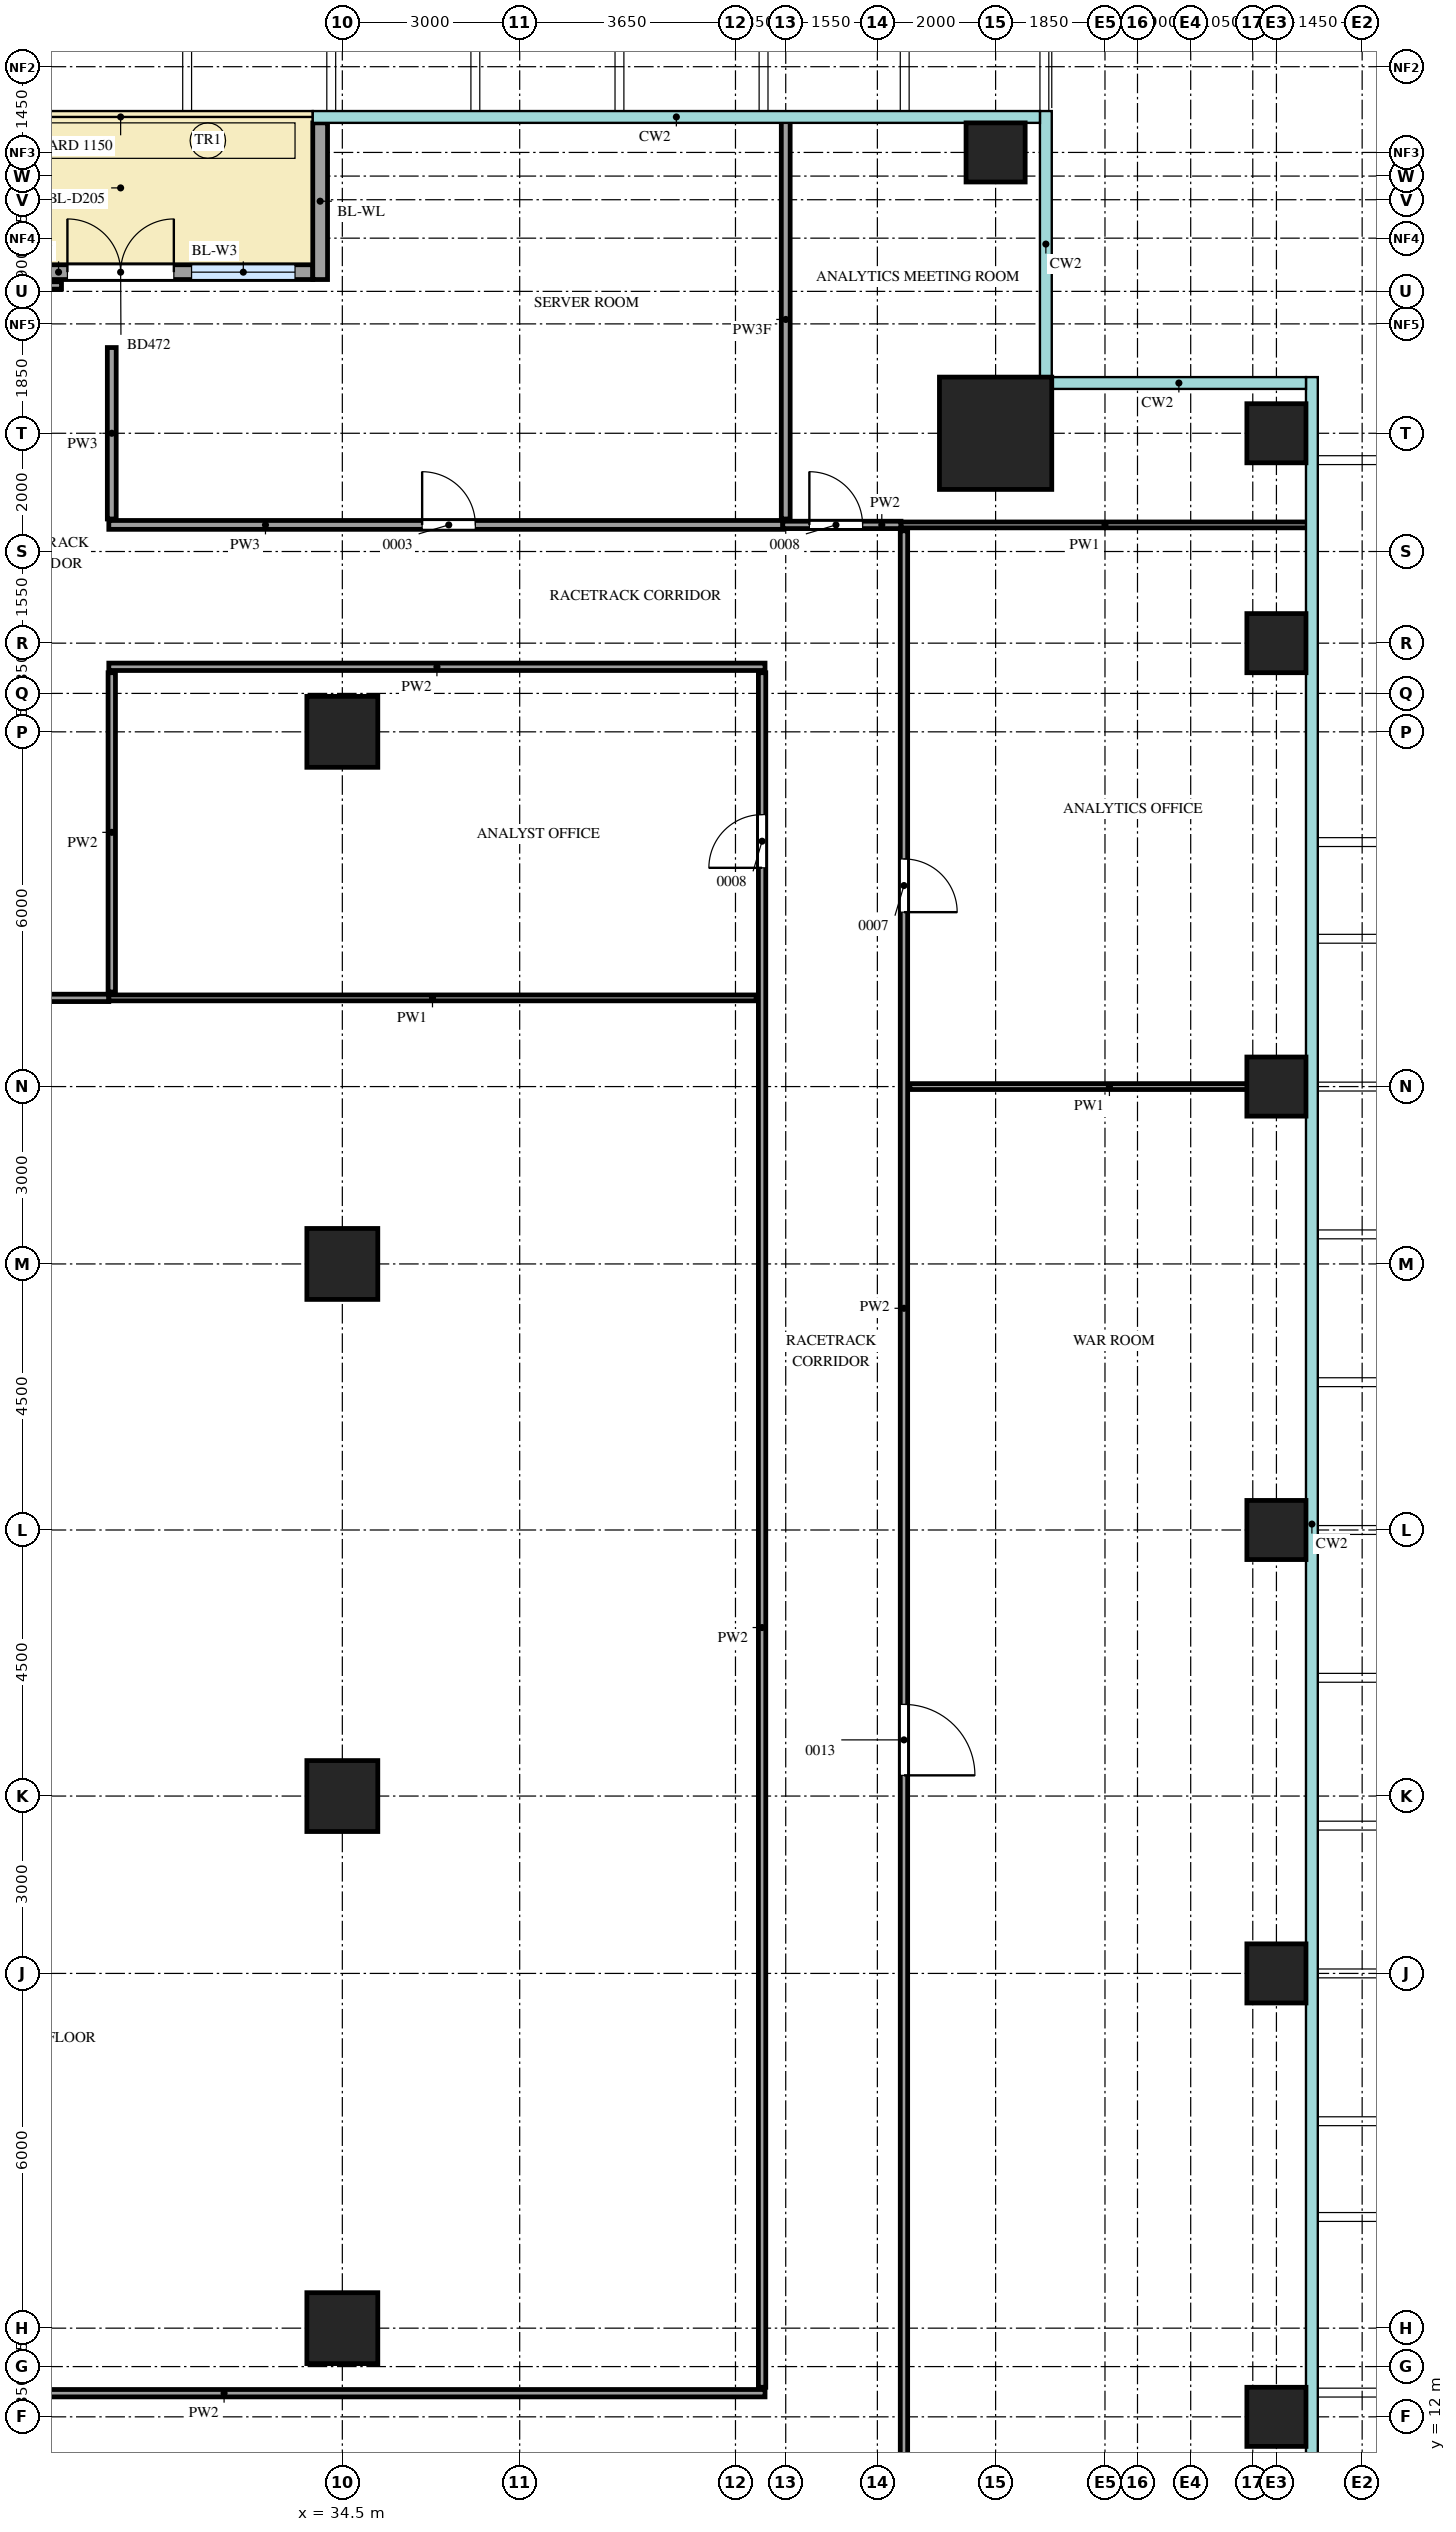
"""IFC4 building model, lengths in metres.
Left out: names, types, materials, properties, quantities, classifications, styles, units other than length and angle.
Written with IfcOpenShell. Run it as: python <this file> out.ifc"""

import sys

from ifc_helpers import new_model, si_unit, direction, frame, frame_2d, origin, origin_2d, place, context, subcontext, project, spatial, rectangle, extrude, source, transform, mapped, element, fill, save


model = new_model("IFC4")
c1 = context("Model", 3, precision=1e-05, world=origin(), true_north=direction((0.0, 1.0)))
c2 = subcontext(c1, "Body", "Model", "MODEL_VIEW")
j1 = project(units=[si_unit("LENGTHUNIT", "METRE"), si_unit("PLANEANGLEUNIT", "RADIAN")], contexts=[c1])
p1 = place(None, origin())
s1 = spatial("IfcSite", under=j1, at=p1, CompositionType="ELEMENT")
p2 = place(p1, origin())
s2 = spatial("IfcBuilding", under=s1, at=p2, CompositionType="ELEMENT")
p3 = place(p2, frame((0.0, 0.0, 212.7)))
s3 = spatial("IfcBuildingStorey", under=s2, at=p3, CompositionType="ELEMENT", Elevation=212.7)
m1 = source(origin(), c2, "Body", "SweptSolid", [
    extrude(rectangle(XDim=1.9, YDim=1.9, at=origin_2d()), origin(), (0.0, 0.0, 1.0), 4.0),
])
p4 = place(p3, frame((45.55, 45.55, 0.0), z_axis=(0.0, 0.0, 1.0), x_axis=(1.0, 0.0, 0.0)))
e1 = element("IfcColumn", 1, at=p4, inside=s3, PredefinedType="COLUMN", context=c2, shape_type="MappedRepresentation", body=[
    mapped(m1, transform((0.0, 0.0, 0.0))),
])
m2 = source(origin(), c2, "Body", "SweptSolid", [
    extrude(rectangle(XDim=1.0, YDim=1.0, at=origin_2d()), origin(), (0.0, 0.0, 1.0), 4.0),
])
for number, where, z_axis, x_axis in (
    (2, (50.3, 12.0, 0.0), (0.0, 0.0, 1.0), (1.0, 0.0, 0.0)),
    (3, (50.3, 19.5, 0.0), (0.0, 0.0, 1.0), (1.0, 0.0, 0.0)),
    (4, (50.3, 27.0, 0.0), (0.0, 0.0, 1.0), (1.0, 0.0, 0.0)),
    (5, (50.3, 34.5, 0.0), (0.0, 0.0, 1.0), (1.0, 0.0, 0.0)),
    (6, (50.3, 42.0, 0.0), (0.0, 0.0, 1.0), (1.0, 0.0, 0.0)),
    (7, (50.3, 45.55, 0.0), (0.0, 0.0, 1.0), (1.0, 0.0, 0.0)),
    (8, (45.55, 50.3, 0.0), (0.0, 0.0, 1.0), (1.0, 0.0, 0.0)),
):
    element("IfcColumn", number, at=place(p3, frame(where, z_axis=z_axis, x_axis=x_axis)), inside=s3, PredefinedType="COLUMN", context=c2, shape_type="MappedRepresentation", body=[
        mapped(m2, transform((0.0, 0.0, 0.0))),
    ])
m3 = source(origin(), c2, "Body", "SweptSolid", [
    extrude(rectangle(XDim=1.2, YDim=1.2, at=origin_2d()), origin(), (0.0, 0.0, 1.0), 4.0),
])
for number, where, z_axis, x_axis in (
    (9, (34.5, 13.5, 0.0), (0.0, 0.0, 1.0), (1.0, 0.0, 0.0)),
    (10, (34.5, 22.5, 0.0), (0.0, 0.0, 1.0), (1.0, 0.0, 0.0)),
    (11, (34.5, 31.5, 0.0), (0.0, 0.0, 1.0), (1.0, 0.0, 0.0)),
    (12, (34.5, 40.5, 0.0), (0.0, 0.0, 1.0), (1.0, 0.0, 0.0)),
):
    element("IfcColumn", number, at=place(p3, frame(where, z_axis=z_axis, x_axis=x_axis)), inside=s3, PredefinedType="COLUMN", context=c2, shape_type="MappedRepresentation", body=[
        mapped(m3, transform((0.0, 0.0, 0.0))),
    ])
m4 = source(origin(), c2, "Body", "SweptSolid", [
    extrude(rectangle(XDim=6.5, YDim=0.25, at=frame_2d((3.25, 0.0))), origin(), (0.0, 0.0, 1.0), 3.75),
])
p5 = place(p3, frame((27.5, 48.275, 0.0), z_axis=(0.0, 0.0, 1.0), x_axis=(1.0, 0.0, 0.0)))
e13 = element("IfcWall", 13, at=p5, inside=s3, PredefinedType="SOLIDWALL", context=c2, shape_type="MappedRepresentation", body=[
    mapped(m4, transform((0.0, 0.0, 0.0))),
])
m5 = source(origin(), c2, "Body", "SweptSolid", [
    extrude(rectangle(XDim=1.75, YDim=2.4, at=frame_2d((0.875, 1.2))), frame((0.0, 0.135, 0.0), z_axis=(0.0, -1.0, 0.0), x_axis=(1.0, 0.0, 0.0)), (0.0, 0.0, 1.0), 0.27),
])
p6 = place(p5, frame((0.3, 0.0, 0.0)))
e14 = element("IfcOpeningElement", 14, at=p6, cuts=e13, PredefinedType="OPENING", context=c2, shape_type="MappedRepresentation", body=[
    mapped(m5, transform((0.0, 0.0, 0.0))),
])
p7 = place(p5, frame((4.45, 0.0, 0.0)))
e15 = element("IfcOpeningElement", 15, at=p7, cuts=e13, PredefinedType="OPENING", context=c2, shape_type="MappedRepresentation", body=[
    mapped(m5, transform((0.0, 0.0, 0.0))),
])
m6 = source(origin(), c2, "Body", "SweptSolid", [
    extrude(rectangle(XDim=1.8, YDim=2.4, at=frame_2d((0.9, 1.2))), frame((0.0, 0.135, 0.0), z_axis=(0.0, -1.0, 0.0), x_axis=(1.0, 0.0, 0.0)), (0.0, 0.0, 1.0), 0.27),
])
p8 = place(p5, frame((2.35, 0.0, 0.0)))
e16 = element("IfcOpeningElement", 16, at=p8, cuts=e13, PredefinedType="OPENING", context=c2, shape_type="MappedRepresentation", body=[
    mapped(m6, transform((0.0, 0.0, 0.0))),
])
m7 = source(origin(), c2, "Body", "SweptSolid", [
    extrude(rectangle(XDim=2.65, YDim=0.25, at=frame_2d((1.325, 0.0))), origin(), (0.0, 0.0, 1.0), 3.1),
])
p9 = place(p3, frame((34.125, 50.8, 0.0), z_axis=(0.0, 0.0, 1.0), x_axis=(0.0, -1.0, 0.0)))
e17 = element("IfcWall", 17, at=p9, inside=s3, PredefinedType="SOLIDWALL", context=c2, shape_type="MappedRepresentation", body=[
    mapped(m7, transform((0.0, 0.0, 0.0))),
])
m8 = source(origin(), c2, "Body", "SweptSolid", [
    extrude(rectangle(XDim=33.8, YDim=0.125, at=frame_2d((16.9, 0.0))), origin(), (0.0, 0.0, 1.0), 3.8),
])
p10 = place(p3, frame((44.0, 10.1, 0.0), z_axis=(0.0, 0.0, 1.0), x_axis=(0.0, 1.0, 0.0)))
e18 = element("IfcWall", 18, at=p10, inside=s3, PredefinedType="PARTITIONING", context=c2, shape_type="MappedRepresentation", body=[
    mapped(m8, transform((0.0, 0.0, 0.0))),
])
m9 = source(origin(), c2, "Body", "SweptSolid", [
    extrude(rectangle(XDim=1.2, YDim=2.1, at=frame_2d((0.6, 1.05))), frame((0.0, 0.073, 0.0), z_axis=(0.0, -1.0, 0.0), x_axis=(1.0, 0.0, 0.0)), (0.0, 0.0, 1.0), 0.145),
])
p11 = place(p10, frame((12.75, 0.0, 0.0)))
e19 = element("IfcOpeningElement", 19, at=p11, cuts=e18, PredefinedType="OPENING", context=c2, shape_type="MappedRepresentation", body=[
    mapped(m9, transform((0.0, 0.0, 0.0))),
])
m10 = source(origin(), c2, "Body", "SweptSolid", [
    extrude(rectangle(XDim=0.9, YDim=2.1, at=frame_2d((0.45, 1.05))), frame((0.0, 0.073, 0.0), z_axis=(0.0, -1.0, 0.0), x_axis=(1.0, 0.0, 0.0)), (0.0, 0.0, 1.0), 0.145),
])
p12 = place(p10, frame((27.35, 0.0, 0.0)))
e20 = element("IfcOpeningElement", 20, at=p12, cuts=e18, PredefinedType="OPENING", context=c2, shape_type="MappedRepresentation", body=[
    mapped(m10, transform((0.0, 0.0, 0.0))),
])
m11 = source(origin(), c2, "Body", "SweptSolid", [
    extrude(rectangle(XDim=18.3, YDim=0.125, at=frame_2d((9.15, 0.0))), origin(), (0.0, 0.0, 1.0), 3.8),
])
p13 = place(p3, frame((23.35, 12.4, 0.0), z_axis=(0.0, 0.0, 1.0), x_axis=(1.0, 0.0, 0.0)))
e21 = element("IfcWall", 21, at=p13, inside=s3, PredefinedType="PARTITIONING", context=c2, shape_type="MappedRepresentation", body=[
    mapped(m11, transform((0.0, 0.0, 0.0))),
])
m12 = source(origin(), c2, "Body", "SweptSolid", [
    extrude(rectangle(XDim=29.0, YDim=0.125, at=frame_2d((14.5, 0.0))), origin(), (0.0, 0.0, 1.0), 3.8),
])
p14 = place(p3, frame((41.6, 12.5, 0.0), z_axis=(0.0, 0.0, 1.0), x_axis=(0.0, 1.0, 0.0)))
e22 = element("IfcWall", 22, at=p14, inside=s3, PredefinedType="PARTITIONING", context=c2, shape_type="MappedRepresentation", body=[
    mapped(m12, transform((0.0, 0.0, 0.0))),
])
p15 = place(p14, frame((25.7, 0.0, 0.0)))
e23 = element("IfcOpeningElement", 23, at=p15, cuts=e22, PredefinedType="OPENING", context=c2, shape_type="MappedRepresentation", body=[
    mapped(m10, transform((0.0, 0.0, 0.0))),
])
m13 = source(origin(), c2, "Body", "SweptSolid", [
    extrude(rectangle(XDim=6.75, YDim=0.1, at=frame_2d((3.375, 0.0))), origin(), (0.0, 0.0, 1.0), 3.8),
])
p16 = place(p3, frame((44.1, 34.5, 0.0), z_axis=(0.0, 0.0, 1.0), x_axis=(1.0, 0.0, 0.0)))
e24 = element("IfcWall", 24, at=p16, inside=s3, PredefinedType="PARTITIONING", context=c2, shape_type="MappedRepresentation", body=[
    mapped(m13, transform((0.0, 0.0, 0.0))),
])
m14 = source(origin(), c2, "Body", "SweptSolid", [
    extrude(rectangle(XDim=7.2, YDim=0.125, at=frame_2d((3.6, 0.0))), origin(), (0.0, 0.0, 1.0), 3.8),
])
p17 = place(p3, frame((23.35, 36.0, 0.0), z_axis=(0.0, 0.0, 1.0), x_axis=(1.0, 0.0, 0.0)))
e25 = element("IfcWall", 25, at=p17, inside=s3, PredefinedType="PARTITIONING", context=c2, shape_type="MappedRepresentation", body=[
    mapped(m14, transform((0.0, 0.0, 0.0))),
])
m15 = source(origin(), c2, "Body", "SweptSolid", [
    extrude(rectangle(XDim=10.95, YDim=0.1, at=frame_2d((5.475, 0.0))), origin(), (0.0, 0.0, 1.0), 3.8),
])
p18 = place(p3, frame((30.55, 36.0, 0.0), z_axis=(0.0, 0.0, 1.0), x_axis=(1.0, 0.0, 0.0)))
e26 = element("IfcWall", 26, at=p18, inside=s3, PredefinedType="PARTITIONING", context=c2, shape_type="MappedRepresentation", body=[
    mapped(m15, transform((0.0, 0.0, 0.0))),
])
m16 = source(origin(), c2, "Body", "SweptSolid", [
    extrude(rectangle(XDim=5.4, YDim=0.125, at=frame_2d((2.7, 0.0))), origin(), (0.0, 0.0, 1.0), 3.8),
])
p19 = place(p3, frame((30.6, 36.1, 0.0), z_axis=(0.0, 0.0, 1.0), x_axis=(0.0, 1.0, 0.0)))
e27 = element("IfcWall", 27, at=p19, inside=s3, PredefinedType="PARTITIONING", context=c2, shape_type="MappedRepresentation", body=[
    mapped(m16, transform((0.0, 0.0, 0.0))),
])
m17 = source(origin(), c2, "Body", "SweptSolid", [
    extrude(rectangle(XDim=11.1, YDim=0.125, at=frame_2d((5.55, 0.0))), origin(), (0.0, 0.0, 1.0), 3.8),
])
p20 = place(p3, frame((30.55, 41.6, 0.0), z_axis=(0.0, 0.0, 1.0), x_axis=(1.0, 0.0, 0.0)))
e28 = element("IfcWall", 28, at=p20, inside=s3, PredefinedType="PARTITIONING", context=c2, shape_type="MappedRepresentation", body=[
    mapped(m17, transform((0.0, 0.0, 0.0))),
])
m18 = source(origin(), c2, "Body", "SweptSolid", [
    extrude(rectangle(XDim=11.4, YDim=0.15, at=frame_2d((5.7, 0.0))), origin(), (0.0, 0.0, 1.0), 3.8),
])
p21 = place(p3, frame((30.55, 44.0, 0.0), z_axis=(0.0, 0.0, 1.0), x_axis=(1.0, 0.0, 0.0)))
e29 = element("IfcWall", 29, at=p21, inside=s3, PredefinedType="PARTITIONING", context=c2, shape_type="MappedRepresentation", body=[
    mapped(m18, transform((0.0, 0.0, 0.0))),
])
m19 = source(origin(), c2, "Body", "SweptSolid", [
    extrude(rectangle(XDim=0.9, YDim=2.1, at=frame_2d((0.45, 1.05))), frame((0.0, 0.085, 0.0), z_axis=(0.0, -1.0, 0.0), x_axis=(1.0, 0.0, 0.0)), (0.0, 0.0, 1.0), 0.17),
])
p22 = place(p21, frame((5.3, 0.0, 0.0)))
e30 = element("IfcOpeningElement", 30, at=p22, cuts=e29, PredefinedType="OPENING", context=c2, shape_type="MappedRepresentation", body=[
    mapped(m19, transform((0.0, 0.0, 0.0))),
])
m20 = source(origin(), c2, "Body", "SweptSolid", [
    extrude(rectangle(XDim=2.0, YDim=0.125, at=frame_2d((1.0, 0.0))), origin(), (0.0, 0.0, 1.0), 3.8),
])
p23 = place(p3, frame((41.95, 44.0, 0.0), z_axis=(0.0, 0.0, 1.0), x_axis=(1.0, 0.0, 0.0)))
e31 = element("IfcWall", 31, at=p23, inside=s3, PredefinedType="PARTITIONING", context=c2, shape_type="MappedRepresentation", body=[
    mapped(m20, transform((0.0, 0.0, 0.0))),
])
p24 = place(p23, frame((0.45, 0.0, 0.0)))
e32 = element("IfcOpeningElement", 32, at=p24, cuts=e31, PredefinedType="OPENING", context=c2, shape_type="MappedRepresentation", body=[
    mapped(m10, transform((0.0, 0.0, 0.0))),
])
m21 = source(origin(), c2, "Body", "SweptSolid", [
    extrude(rectangle(XDim=6.9, YDim=0.1, at=frame_2d((3.45, 0.0))), origin(), (0.0, 0.0, 1.0), 3.8),
])
p25 = place(p3, frame((43.95, 44.0, 0.0), z_axis=(0.0, 0.0, 1.0), x_axis=(1.0, 0.0, 0.0)))
e33 = element("IfcWall", 33, at=p25, inside=s3, PredefinedType="PARTITIONING", context=c2, shape_type="MappedRepresentation", body=[
    mapped(m21, transform((0.0, 0.0, 0.0))),
])
m22 = source(origin(), c2, "Body", "SweptSolid", [
    extrude(rectangle(XDim=2.9, YDim=0.15, at=frame_2d((1.45, 0.0))), origin(), (0.0, 0.0, 1.0), 3.8),
])
p26 = place(p3, frame((30.6, 44.1, 0.0), z_axis=(0.0, 0.0, 1.0), x_axis=(0.0, 1.0, 0.0)))
e34 = element("IfcWall", 34, at=p26, inside=s3, PredefinedType="PARTITIONING", context=c2, shape_type="MappedRepresentation", body=[
    mapped(m22, transform((0.0, 0.0, 0.0))),
])
m23 = source(origin(), c2, "Body", "SweptSolid", [
    extrude(rectangle(XDim=6.75, YDim=0.15, at=frame_2d((3.375, 0.0))), origin(), (0.0, 0.0, 1.0), 3.15),
])
p27 = place(p3, frame((42.0, 44.1, 0.0), z_axis=(0.0, 0.0, 1.0), x_axis=(0.0, 1.0, 0.0)))
e35 = element("IfcWall", 35, at=p27, inside=s3, PredefinedType="PARTITIONING", context=c2, shape_type="MappedRepresentation", body=[
    mapped(m23, transform((0.0, 0.0, 0.0))),
])
m24 = source(origin(), c2, "Body", "SweptSolid", [
    extrude(rectangle(XDim=13.0, YDim=0.125, at=frame_2d((6.5, 0.0))), origin(), (0.0, 0.0, 1.0), 3.8),
])
p28 = place(p3, frame((16.75, 48.05, 0.0), z_axis=(0.0, 0.0, 1.0), x_axis=(1.0, 0.0, 0.0)))
e36 = element("IfcWall", 36, at=p28, inside=s3, PredefinedType="PARTITIONING", context=c2, shape_type="MappedRepresentation", body=[
    mapped(m24, transform((0.0, 0.0, 0.0))),
])
p29 = place(p28, frame((7.7, 0.0, 0.0)))
e37 = element("IfcOpeningElement", 37, at=p29, cuts=e36, PredefinedType="OPENING", context=c2, shape_type="MappedRepresentation", body=[
    mapped(m10, transform((0.0, 0.0, 0.0))),
])
m25 = source(origin(), c2, "Body", "SweptSolid", [
    extrude(rectangle(XDim=1.75, YDim=2.4, at=frame_2d((0.875, 1.2))), frame((0.0, 0.03, 0.0), z_axis=(0.0, -1.0, 0.0), x_axis=(1.0, 0.0, 0.0)), (0.0, 0.0, 1.0), 0.06),
])
p30 = place(p7, origin())
e38 = element("IfcWindow", 38, at=p30, inside=s3, PartitioningType="SINGLE_PANEL", PredefinedType="WINDOW", context=c2, shape_type="MappedRepresentation", body=[
    mapped(m25, transform((0.0, 0.0, 0.0))),
])
fill(e15, e38)
m26 = source(origin(), c2, "Body", "SweptSolid", [
    extrude(rectangle(XDim=1.8, YDim=2.4, at=frame_2d((0.9, 1.2))), frame((0.0, 0.025, 0.0), z_axis=(0.0, -1.0, 0.0), x_axis=(1.0, 0.0, 0.0)), (0.0, 0.0, 1.0), 0.05),
])
p31 = place(p8, origin())
e39 = element("IfcDoor", 39, at=p31, inside=s3, OperationType="DOUBLE_DOOR_DOUBLE_SWING", PredefinedType="DOOR", context=c2, shape_type="MappedRepresentation", body=[
    mapped(m26, transform((0.0, 0.0, 0.0))),
])
fill(e16, e39)
m27 = source(origin(), c2, "Body", "SweptSolid", [
    extrude(rectangle(XDim=1.2, YDim=2.1, at=frame_2d((0.6, 1.05))), frame((0.0, 0.025, 0.0), z_axis=(0.0, -1.0, 0.0), x_axis=(1.0, 0.0, 0.0)), (0.0, 0.0, 1.0), 0.05),
])
p32 = place(p11, origin())
e40 = element("IfcDoor", 40, at=p32, inside=s3, OperationType="SINGLE_SWING_LEFT", PredefinedType="DOOR", context=c2, shape_type="MappedRepresentation", body=[
    mapped(m27, transform((0.0, 0.0, 0.0))),
])
fill(e19, e40)
m28 = source(origin(), c2, "Body", "SweptSolid", [
    extrude(rectangle(XDim=0.9, YDim=2.1, at=frame_2d((0.45, 1.05))), frame((0.0, 0.025, 0.0), z_axis=(0.0, -1.0, 0.0), x_axis=(1.0, 0.0, 0.0)), (0.0, 0.0, 1.0), 0.05),
])
p33 = place(p12, origin())
e41 = element("IfcDoor", 41, at=p33, inside=s3, OperationType="SINGLE_SWING_LEFT", PredefinedType="DOOR", context=c2, shape_type="MappedRepresentation", body=[
    mapped(m28, transform((0.0, 0.0, 0.0))),
])
fill(e20, e41)
p34 = place(p22, origin())
e42 = element("IfcDoor", 42, at=p34, inside=s3, OperationType="SINGLE_SWING_RIGHT", PredefinedType="DOOR", context=c2, shape_type="MappedRepresentation", body=[
    mapped(m28, transform((0.0, 0.0, 0.0))),
])
fill(e30, e42)
p35 = place(p24, origin())
e43 = element("IfcDoor", 43, at=p35, inside=s3, OperationType="SINGLE_SWING_RIGHT", PredefinedType="DOOR", context=c2, shape_type="MappedRepresentation", body=[
    mapped(m28, transform((0.0, 0.0, 0.0))),
])
fill(e32, e43)
p36 = place(p15, origin())
e44 = element("IfcDoor", 44, at=p36, inside=s3, OperationType="SINGLE_SWING_RIGHT", PredefinedType="DOOR", context=c2, shape_type="MappedRepresentation", body=[
    mapped(m28, transform((0.0, 0.0, 0.0))),
])
fill(e23, e44)
save(model, sys.argv[1])
